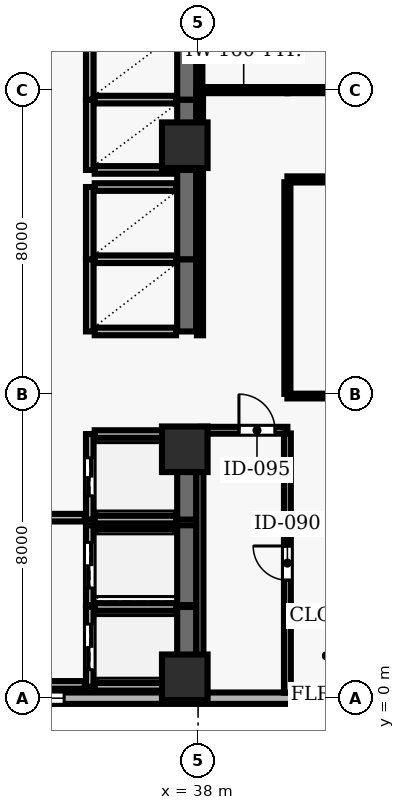
"""IFC4 building model, lengths in metres.
Left out: names, types, materials, properties, quantities, classifications, styles, units other than length and angle.
Written with IfcOpenShell. Run it as: python <this file> out.ifc"""

import sys

from ifc_helpers import new_model, si_unit, direction, frame, frame_2d, origin, origin_2d, place, context, subcontext, project, spatial, rectangle, extrude, element, fill, save


model = new_model("IFC4")
c1 = context("Model", 3, precision=1e-05, world=origin(), true_north=direction((0.0, 1.0)))
c2 = subcontext(c1, "Body", "Model", "MODEL_VIEW")
j1 = project(units=[si_unit("LENGTHUNIT", "METRE"), si_unit("PLANEANGLEUNIT", "RADIAN")], contexts=[c1])
p1 = place(None, origin())
s1 = spatial("IfcSite", under=j1, at=p1, CompositionType="ELEMENT")
p2 = place(p1, origin())
s2 = spatial("IfcBuilding", under=s1, at=p2, CompositionType="ELEMENT")
p3 = place(p2, frame((0.0, 0.0, 126.8)))
s3 = spatial("IfcBuildingStorey", under=s2, at=p3, CompositionType="ELEMENT", Elevation=126.8)
for number, where, z_axis, x_axis in (
    (1, (37.65, 0.55, 0.0), (0.0, 0.0, 1.0), (1.0, 0.0, 0.0)),
    (2, (37.65, 6.55, 0.0), (0.0, 0.0, 1.0), (1.0, 0.0, 0.0)),
    (3, (37.65, 14.55, 0.0), (0.0, 0.0, 1.0), (1.0, 0.0, 0.0)),
):
    element("IfcColumn", number, at=place(p3, frame(where, z_axis=z_axis, x_axis=x_axis)), inside=s3, PredefinedType="COLUMN", context=c2, shape_type="SweptSolid", body=[
        extrude(rectangle(XDim=1.2, YDim=1.2, at=origin_2d()), origin(), (0.0, 0.0, 1.0), 3.9),
    ])
p4 = place(p3, frame((24.5, 0.0, 0.0), z_axis=(0.0, 0.0, 1.0), x_axis=(1.0, 0.0, 0.0)))
e4 = element("IfcWall", 4, at=p4, inside=s3, PredefinedType="SOLIDWALL", context=c2, shape_type="SweptSolid", body=[
    extrude(rectangle(XDim=43.6, YDim=0.3, at=frame_2d((21.8, 0.0))), origin(), (0.0, 0.0, 1.0), 3.69),
])
p5 = place(p4, frame((1.825, 0.0, 0.9)))
e5 = element("IfcOpeningElement", 5, at=p5, cuts=e4, PredefinedType="OPENING", context=c2, shape_type="SweptSolid", body=[
    extrude(rectangle(XDim=1.8, YDim=1.8, at=frame_2d((0.9, 0.9))), frame((0.0, 0.16, 0.0), z_axis=(0.0, -1.0, 0.0), x_axis=(1.0, 0.0, 0.0)), (0.0, 0.0, 1.0), 0.32),
])
p6 = place(p4, frame((8.175, 0.0, 0.9)))
e6 = element("IfcOpeningElement", 6, at=p6, cuts=e4, PredefinedType="OPENING", context=c2, shape_type="SweptSolid", body=[
    extrude(rectangle(XDim=1.8, YDim=1.8, at=frame_2d((0.9, 0.9))), frame((0.0, 0.16, 0.0), z_axis=(0.0, -1.0, 0.0), x_axis=(1.0, 0.0, 0.0)), (0.0, 0.0, 1.0), 0.32),
])
p7 = place(p4, frame((18.175, 0.0, 0.9)))
e7 = element("IfcOpeningElement", 7, at=p7, cuts=e4, PredefinedType="OPENING", context=c2, shape_type="SweptSolid", body=[
    extrude(rectangle(XDim=1.8, YDim=1.8, at=frame_2d((0.9, 0.9))), frame((0.0, 0.16, 0.0), z_axis=(0.0, -1.0, 0.0), x_axis=(1.0, 0.0, 0.0)), (0.0, 0.0, 1.0), 0.32),
])
p8 = place(p4, frame((24.075, 0.0, 0.9)))
e8 = element("IfcOpeningElement", 8, at=p8, cuts=e4, PredefinedType="OPENING", context=c2, shape_type="SweptSolid", body=[
    extrude(rectangle(XDim=1.8, YDim=1.8, at=frame_2d((0.9, 0.9))), frame((0.0, 0.16, 0.0), z_axis=(0.0, -1.0, 0.0), x_axis=(1.0, 0.0, 0.0)), (0.0, 0.0, 1.0), 0.32),
])
p9 = place(p4, frame((29.075, 0.0, 0.9)))
e9 = element("IfcOpeningElement", 9, at=p9, cuts=e4, PredefinedType="OPENING", context=c2, shape_type="SweptSolid", body=[
    extrude(rectangle(XDim=1.8, YDim=1.8, at=frame_2d((0.9, 0.9))), frame((0.0, 0.16, 0.0), z_axis=(0.0, -1.0, 0.0), x_axis=(1.0, 0.0, 0.0)), (0.0, 0.0, 1.0), 0.32),
])
p10 = place(p4, frame((34.525, 0.0, 0.9)))
e10 = element("IfcOpeningElement", 10, at=p10, cuts=e4, PredefinedType="OPENING", context=c2, shape_type="SweptSolid", body=[
    extrude(rectangle(XDim=1.8, YDim=1.8, at=frame_2d((0.9, 0.9))), frame((0.0, 0.16, 0.0), z_axis=(0.0, -1.0, 0.0), x_axis=(1.0, 0.0, 0.0)), (0.0, 0.0, 1.0), 0.32),
])
p11 = place(p4, frame((39.975, 0.0, 0.9)))
e11 = element("IfcOpeningElement", 11, at=p11, cuts=e4, PredefinedType="OPENING", context=c2, shape_type="SweptSolid", body=[
    extrude(rectangle(XDim=1.8, YDim=1.8, at=frame_2d((0.9, 0.9))), frame((0.0, 0.16, 0.0), z_axis=(0.0, -1.0, 0.0), x_axis=(1.0, 0.0, 0.0)), (0.0, 0.0, 1.0), 0.32),
])
p12 = place(p3, frame((35.15, 2.4, 0.0), z_axis=(0.0, 0.0, 1.0), x_axis=(0.0, -1.0, 0.0)))
e12 = element("IfcWall", 12, at=p12, inside=s3, PredefinedType="SOLIDWALL", context=c2, shape_type="SweptSolid", body=[
    extrude(rectangle(XDim=2.1, YDim=0.2, at=frame_2d((1.05, 0.0))), origin(), (0.0, 0.0, 1.0), 3.69),
])
p13 = place(p12, frame((0.45, 0.0, 0.0)))
e13 = element("IfcOpeningElement", 13, at=p13, cuts=e12, PredefinedType="OPENING", context=c2, shape_type="SweptSolid", body=[
    extrude(rectangle(XDim=1.2, YDim=2.15, at=frame_2d((0.6, 1.075))), frame((0.0, 0.11, 0.0), z_axis=(0.0, -1.0, 0.0), x_axis=(1.0, 0.0, 0.0)), (0.0, 0.0, 1.0), 0.22),
])
p14 = place(p3, frame((37.7, 0.3, 0.0), z_axis=(0.0, 0.0, 1.0), x_axis=(0.0, 1.0, 0.0)))
e14 = element("IfcWall", 14, at=p14, inside=s3, PredefinedType="SHEAR", context=c2, shape_type="SweptSolid", body=[
    extrude(rectangle(XDim=2.1, YDim=0.5, at=frame_2d((1.05, 0.0))), origin(), (0.0, 0.0, 1.0), 3.69),
])
for number, where, z_axis, x_axis in (
    (15, (35.28, 0.3, 0.0), (0.0, 0.0, 1.0), (1.0, 0.0, 0.0)),
    (16, (37.42, 2.4, 0.0), (0.0, 0.0, 1.0), (-1.0, 0.0, 0.0)),
):
    element("IfcWall", number, at=place(p3, frame(where, z_axis=z_axis, x_axis=x_axis)), inside=s3, PredefinedType="SOLIDWALL", context=c2, shape_type="SweptSolid", body=[
        extrude(rectangle(XDim=2.14, YDim=0.2, at=frame_2d((1.07, 0.0))), origin(), (0.0, 0.0, 1.0), 3.69),
    ])
p15 = place(p3, frame((35.15, 4.55, 0.0), z_axis=(0.0, 0.0, 1.0), x_axis=(0.0, -1.0, 0.0)))
e17 = element("IfcWall", 17, at=p15, inside=s3, PredefinedType="SOLIDWALL", context=c2, shape_type="SweptSolid", body=[
    extrude(rectangle(XDim=2.1, YDim=0.2, at=frame_2d((1.05, 0.0))), origin(), (0.0, 0.0, 1.0), 3.69),
])
p16 = place(p15, frame((0.45, 0.0, 0.0)))
e18 = element("IfcOpeningElement", 18, at=p16, cuts=e17, PredefinedType="OPENING", context=c2, shape_type="SweptSolid", body=[
    extrude(rectangle(XDim=1.2, YDim=2.15, at=frame_2d((0.6, 1.075))), frame((0.0, 0.11, 0.0), z_axis=(0.0, -1.0, 0.0), x_axis=(1.0, 0.0, 0.0)), (0.0, 0.0, 1.0), 0.22),
])
p17 = place(p3, frame((37.7, 2.45, 0.0), z_axis=(0.0, 0.0, 1.0), x_axis=(0.0, 1.0, 0.0)))
e19 = element("IfcWall", 19, at=p17, inside=s3, PredefinedType="SHEAR", context=c2, shape_type="SweptSolid", body=[
    extrude(rectangle(XDim=2.1, YDim=0.5, at=frame_2d((1.05, 0.0))), origin(), (0.0, 0.0, 1.0), 3.69),
])
p18 = place(p3, frame((37.42, 4.55, 0.0), z_axis=(0.0, 0.0, 1.0), x_axis=(-1.0, 0.0, 0.0)))
e20 = element("IfcWall", 20, at=p18, inside=s3, PredefinedType="SOLIDWALL", context=c2, shape_type="SweptSolid", body=[
    extrude(rectangle(XDim=2.14, YDim=0.2, at=frame_2d((1.07, 0.0))), origin(), (0.0, 0.0, 1.0), 3.69),
])
p19 = place(p3, frame((35.15, 6.95, 0.0), z_axis=(0.0, 0.0, 1.0), x_axis=(0.0, -1.0, 0.0)))
e21 = element("IfcWall", 21, at=p19, inside=s3, PredefinedType="SOLIDWALL", context=c2, shape_type="SweptSolid", body=[
    extrude(rectangle(XDim=2.25, YDim=0.2, at=frame_2d((1.125, 0.0))), origin(), (0.0, 0.0, 1.0), 3.69),
])
p20 = place(p19, frame((0.625, 0.0, 0.0)))
e22 = element("IfcOpeningElement", 22, at=p20, cuts=e21, PredefinedType="OPENING", context=c2, shape_type="SweptSolid", body=[
    extrude(rectangle(XDim=1.0, YDim=2.1, at=frame_2d((0.5, 1.05))), frame((0.0, 0.11, 0.0), z_axis=(0.0, -1.0, 0.0), x_axis=(1.0, 0.0, 0.0)), (0.0, 0.0, 1.0), 0.22),
])
p21 = place(p3, frame((37.7, 4.7, 0.0), z_axis=(0.0, 0.0, 1.0), x_axis=(0.0, 1.0, 0.0)))
e23 = element("IfcWall", 23, at=p21, inside=s3, PredefinedType="SHEAR", context=c2, shape_type="SweptSolid", body=[
    extrude(rectangle(XDim=2.25, YDim=0.5, at=frame_2d((1.125, 0.0))), origin(), (0.0, 0.0, 1.0), 3.69),
])
for number, where, z_axis, x_axis in (
    (24, (35.28, 4.7, 0.0), (0.0, 0.0, 1.0), (1.0, 0.0, 0.0)),
    (25, (37.42, 6.95, 0.0), (0.0, 0.0, 1.0), (-1.0, 0.0, 0.0)),
):
    element("IfcWall", number, at=place(p3, frame(where, z_axis=z_axis, x_axis=x_axis)), inside=s3, PredefinedType="SOLIDWALL", context=c2, shape_type="SweptSolid", body=[
        extrude(rectangle(XDim=2.14, YDim=0.2, at=frame_2d((1.07, 0.0))), origin(), (0.0, 0.0, 1.0), 3.69),
    ])
p22 = place(p3, frame((35.15, 11.55, 0.0), z_axis=(0.0, 0.0, 1.0), x_axis=(0.0, -1.0, 0.0)))
e26 = element("IfcWall", 26, at=p22, inside=s3, PredefinedType="SOLIDWALL", context=c2, shape_type="SweptSolid", body=[
    extrude(rectangle(XDim=1.9, YDim=0.2, at=frame_2d((0.95, 0.0))), origin(), (0.0, 0.0, 1.0), 3.69),
])
p23 = place(p3, frame((37.7, 9.65, 0.0), z_axis=(0.0, 0.0, 1.0), x_axis=(0.0, 1.0, 0.0)))
e27 = element("IfcWall", 27, at=p23, inside=s3, PredefinedType="SHEAR", context=c2, shape_type="SweptSolid", body=[
    extrude(rectangle(XDim=1.9, YDim=0.5, at=frame_2d((0.95, 0.0))), origin(), (0.0, 0.0, 1.0), 3.69),
])
for number, where, z_axis, x_axis in (
    (28, (35.28, 9.65, 0.0), (0.0, 0.0, 1.0), (1.0, 0.0, 0.0)),
    (29, (37.42, 11.55, 0.0), (0.0, 0.0, 1.0), (-1.0, 0.0, 0.0)),
):
    element("IfcWall", number, at=place(p3, frame(where, z_axis=z_axis, x_axis=x_axis)), inside=s3, PredefinedType="SOLIDWALL", context=c2, shape_type="SweptSolid", body=[
        extrude(rectangle(XDim=2.14, YDim=0.2, at=frame_2d((1.07, 0.0))), origin(), (0.0, 0.0, 1.0), 3.69),
    ])
p24 = place(p3, frame((35.15, 13.45, 0.0), z_axis=(0.0, 0.0, 1.0), x_axis=(0.0, -1.0, 0.0)))
e30 = element("IfcWall", 30, at=p24, inside=s3, PredefinedType="SOLIDWALL", context=c2, shape_type="SweptSolid", body=[
    extrude(rectangle(XDim=1.9, YDim=0.2, at=frame_2d((0.95, 0.0))), origin(), (0.0, 0.0, 1.0), 3.69),
])
p25 = place(p3, frame((37.7, 11.55, 0.0), z_axis=(0.0, 0.0, 1.0), x_axis=(0.0, 1.0, 0.0)))
e31 = element("IfcWall", 31, at=p25, inside=s3, PredefinedType="SHEAR", context=c2, shape_type="SweptSolid", body=[
    extrude(rectangle(XDim=2.35, YDim=0.5, at=frame_2d((1.175, 0.0))), origin(), (0.0, 0.0, 1.0), 3.69),
])
p26 = place(p3, frame((37.42, 13.45, 0.0), z_axis=(0.0, 0.0, 1.0), x_axis=(-1.0, 0.0, 0.0)))
e32 = element("IfcWall", 32, at=p26, inside=s3, PredefinedType="SOLIDWALL", context=c2, shape_type="SweptSolid", body=[
    extrude(rectangle(XDim=2.14, YDim=0.2, at=frame_2d((1.07, 0.0))), origin(), (0.0, 0.0, 1.0), 3.69),
])
p27 = place(p3, frame((35.15, 15.75, 0.0), z_axis=(0.0, 0.0, 1.0), x_axis=(0.0, -1.0, 0.0)))
e33 = element("IfcWall", 33, at=p27, inside=s3, PredefinedType="SOLIDWALL", context=c2, shape_type="SweptSolid", body=[
    extrude(rectangle(XDim=1.85, YDim=0.2, at=frame_2d((0.925, 0.0))), origin(), (0.0, 0.0, 1.0), 3.69),
])
p28 = place(p3, frame((37.7, 13.9, 0.0), z_axis=(0.0, 0.0, 1.0), x_axis=(0.0, 1.0, 0.0)))
e34 = element("IfcWall", 34, at=p28, inside=s3, PredefinedType="SHEAR", context=c2, shape_type="SweptSolid", body=[
    extrude(rectangle(XDim=1.85, YDim=0.5, at=frame_2d((0.925, 0.0))), origin(), (0.0, 0.0, 1.0), 3.69),
])
for number, where, z_axis, x_axis in (
    (35, (35.28, 13.9, 0.0), (0.0, 0.0, 1.0), (1.0, 0.0, 0.0)),
    (36, (37.42, 15.75, 0.0), (0.0, 0.0, 1.0), (-1.0, 0.0, 0.0)),
):
    element("IfcWall", number, at=place(p3, frame(where, z_axis=z_axis, x_axis=x_axis)), inside=s3, PredefinedType="SOLIDWALL", context=c2, shape_type="SweptSolid", body=[
        extrude(rectangle(XDim=2.14, YDim=0.2, at=frame_2d((1.07, 0.0))), origin(), (0.0, 0.0, 1.0), 3.69),
    ])
p29 = place(p3, frame((35.15, 17.6, 0.0), z_axis=(0.0, 0.0, 1.0), x_axis=(0.0, -1.0, 0.0)))
e37 = element("IfcWall", 37, at=p29, inside=s3, PredefinedType="SOLIDWALL", context=c2, shape_type="SweptSolid", body=[
    extrude(rectangle(XDim=1.85, YDim=0.2, at=frame_2d((0.925, 0.0))), origin(), (0.0, 0.0, 1.0), 3.69),
])
p30 = place(p3, frame((37.7, 15.75, 0.0), z_axis=(0.0, 0.0, 1.0), x_axis=(0.0, 1.0, 0.0)))
e38 = element("IfcWall", 38, at=p30, inside=s3, PredefinedType="SHEAR", context=c2, shape_type="SweptSolid", body=[
    extrude(rectangle(XDim=1.85, YDim=0.5, at=frame_2d((0.925, 0.0))), origin(), (0.0, 0.0, 1.0), 3.69),
])
p31 = place(p3, frame((31.65, 0.35, 0.0), z_axis=(0.0, 0.0, 1.0), x_axis=(1.0, 0.0, 0.0)))
e39 = element("IfcWall", 39, at=p31, inside=s3, PredefinedType="SOLIDWALL", context=c2, shape_type="SweptSolid", body=[
    extrude(rectangle(XDim=3.37, YDim=0.2, at=frame_2d((1.685, 0.0))), origin(), (0.0, 0.0, 1.0), 3.69),
])
p32 = place(p3, frame((35.02, 4.75, 0.0), z_axis=(0.0, 0.0, 1.0), x_axis=(-1.0, 0.0, 0.0)))
e40 = element("IfcWall", 40, at=p32, inside=s3, PredefinedType="SOLIDWALL", context=c2, shape_type="SweptSolid", body=[
    extrude(rectangle(XDim=3.11, YDim=0.2, at=frame_2d((1.555, 0.0))), origin(), (0.0, 0.0, 1.0), 3.69),
])
p33 = place(p32, frame((1.03, 0.0, 0.0)))
e41 = element("IfcOpeningElement", 41, at=p33, cuts=e40, PredefinedType="OPENING", context=c2, shape_type="SweptSolid", body=[
    extrude(rectangle(XDim=1.05, YDim=2.15, at=frame_2d((0.525, 1.075))), frame((0.0, 0.11, 0.0), z_axis=(0.0, -1.0, 0.0), x_axis=(1.0, 0.0, 0.0)), (0.0, 0.0, 1.0), 0.22),
])
p34 = place(p3, frame((38.05, 7.05, 0.0), z_axis=(0.0, 0.0, 1.0), x_axis=(1.0, 0.0, 0.0)))
e42 = element("IfcWall", 42, at=p34, inside=s3, PredefinedType="PARTITIONING", context=c2, shape_type="SweptSolid", body=[
    extrude(rectangle(XDim=2.3, YDim=0.18, at=frame_2d((1.15, 0.0))), origin(), (0.0, 0.0, 1.0), 3.69),
])
p35 = place(p34, frame((1.025, 0.0, 0.0)))
e43 = element("IfcOpeningElement", 43, at=p35, cuts=e42, PredefinedType="OPENING", context=c2, shape_type="SweptSolid", body=[
    extrude(rectangle(XDim=0.95, YDim=2.1, at=frame_2d((0.475, 1.05))), frame((0.0, 0.1, 0.0), z_axis=(0.0, -1.0, 0.0), x_axis=(1.0, 0.0, 0.0)), (0.0, 0.0, 1.0), 0.2),
])
p36 = place(p3, frame((40.35, 13.65, 0.0), z_axis=(0.0, 0.0, 1.0), x_axis=(1.0, 0.0, 0.0)))
e44 = element("IfcWall", 44, at=p36, inside=s3, PredefinedType="PARTITIONING", context=c2, shape_type="SweptSolid", body=[
    extrude(rectangle(XDim=7.56, YDim=0.16, at=frame_2d((3.78, 0.0))), origin(), (0.0, 0.0, 1.0), 3.69),
])
p37 = place(p36, frame((3.33, 0.0, 0.0)))
e45 = element("IfcOpeningElement", 45, at=p37, cuts=e44, PredefinedType="OPENING", context=c2, shape_type="SweptSolid", body=[
    extrude(rectangle(XDim=0.9, YDim=2.1, at=frame_2d((0.45, 1.05))), frame((0.0, 0.09, 0.0), z_axis=(0.0, -1.0, 0.0), x_axis=(1.0, 0.0, 0.0)), (0.0, 0.0, 1.0), 0.18),
])
p38 = place(p3, frame((40.35, 16.0, 0.0), z_axis=(0.0, 0.0, 1.0), x_axis=(-1.0, 0.0, 0.0)))
e46 = element("IfcWall", 46, at=p38, inside=s3, PredefinedType="PARTITIONING", context=c2, shape_type="SweptSolid", body=[
    extrude(rectangle(XDim=2.3, YDim=0.16, at=frame_2d((1.15, 0.0))), origin(), (0.0, 0.0, 1.0), 3.69),
])
p39 = place(p3, frame((40.35, 16.0, 0.0), z_axis=(0.0, 0.0, 1.0), x_axis=(1.0, 0.0, 0.0)))
e47 = element("IfcWall", 47, at=p39, inside=s3, PredefinedType="PARTITIONING", context=c2, shape_type="SweptSolid", body=[
    extrude(rectangle(XDim=6.856, YDim=0.16, at=frame_2d((3.428, 0.0))), origin(), (0.0, 0.0, 1.0), 3.39),
])
p40 = place(p39, frame((2.978, 0.0, 0.0)))
e48 = element("IfcOpeningElement", 48, at=p40, cuts=e47, PredefinedType="OPENING", context=c2, shape_type="SweptSolid", body=[
    extrude(rectangle(XDim=0.9, YDim=2.1, at=frame_2d((0.45, 1.05))), frame((0.0, 0.09, 0.0), z_axis=(0.0, -1.0, 0.0), x_axis=(1.0, 0.0, 0.0)), (0.0, 0.0, 1.0), 0.18),
])
p41 = place(p3, frame((47.91, 7.95, 0.0), z_axis=(0.0, 0.0, 1.0), x_axis=(-1.0, 0.0, 0.0)))
e49 = element("IfcWall", 49, at=p41, inside=s3, PredefinedType="PARTITIONING", context=c2, shape_type="SweptSolid", body=[
    extrude(rectangle(XDim=7.56, YDim=0.125, at=frame_2d((3.78, 0.0))), origin(), (0.0, 0.0, 1.0), 3.074),
])
p42 = place(p3, frame((38.05, 6.965, 0.0), z_axis=(0.0, 0.0, 1.0), x_axis=(0.0, -1.0, 0.0)))
e50 = element("IfcWall", 50, at=p42, inside=s3, PredefinedType="PARTITIONING", context=c2, shape_type="SweptSolid", body=[
    extrude(rectangle(XDim=6.82, YDim=0.18, at=frame_2d((3.41, 0.0))), origin(), (0.0, 0.0, 1.0), 3.074),
])
p43 = place(p3, frame((38.05, 15.925, 0.0), z_axis=(0.0, 0.0, 1.0), x_axis=(0.0, -1.0, 0.0)))
e51 = element("IfcWall", 51, at=p43, inside=s3, PredefinedType="PARTITIONING", context=c2, shape_type="SweptSolid", body=[
    extrude(rectangle(XDim=6.375, YDim=0.16, at=frame_2d((3.188, 0.0))), origin(), (0.0, 0.0, 1.0), 3.074),
])
p44 = place(p3, frame((38.05, 23.85, 0.0), z_axis=(0.0, 0.0, 1.0), x_axis=(0.0, -1.0, 0.0)))
e52 = element("IfcWall", 52, at=p44, inside=s3, PredefinedType="PARTITIONING", context=c2, shape_type="SweptSolid", body=[
    extrude(rectangle(XDim=7.775, YDim=0.125, at=frame_2d((3.888, 0.0))), origin(), (0.0, 0.0, 1.0), 3.074),
])
p45 = place(p3, frame((40.35, 0.145, 0.0), z_axis=(0.0, 0.0, 1.0), x_axis=(0.0, 1.0, 0.0)))
e53 = element("IfcWall", 53, at=p45, inside=s3, PredefinedType="PARTITIONING", context=c2, shape_type="SweptSolid", body=[
    extrude(rectangle(XDim=6.82, YDim=0.18, at=frame_2d((3.41, 0.0))), origin(), (0.0, 0.0, 1.0), 3.69),
])
p46 = place(p45, frame((2.96, 0.0, 0.0)))
e54 = element("IfcOpeningElement", 54, at=p46, cuts=e53, PredefinedType="OPENING", context=c2, shape_type="SweptSolid", body=[
    extrude(rectangle(XDim=0.9, YDim=2.1, at=frame_2d((0.45, 1.05))), frame((0.0, 0.1, 0.0), z_axis=(0.0, -1.0, 0.0), x_axis=(1.0, 0.0, 0.0)), (0.0, 0.0, 1.0), 0.2),
])
p47 = place(p3, frame((40.35, 8.008, 0.0), z_axis=(0.0, 0.0, 1.0), x_axis=(0.0, 1.0, 0.0)))
e55 = element("IfcWall", 55, at=p47, inside=s3, PredefinedType="PARTITIONING", context=c2, shape_type="SweptSolid", body=[
    extrude(rectangle(XDim=5.567, YDim=0.16, at=frame_2d((2.783, 0.0))), origin(), (0.0, 0.0, 1.0), 3.69),
])
p48 = place(p6, origin())
e56 = element("IfcWindow", 56, at=p48, inside=s3, PartitioningType="SINGLE_PANEL", PredefinedType="WINDOW", context=c2, shape_type="SweptSolid", body=[
    extrude(rectangle(XDim=1.8, YDim=1.8, at=frame_2d((0.9, 0.9))), frame((0.0, 0.03, 0.0), z_axis=(0.0, -1.0, 0.0), x_axis=(1.0, 0.0, 0.0)), (0.0, 0.0, 1.0), 0.06),
])
fill(e6, e56)
p49 = place(p13, origin())
e57 = element("IfcDoor", 57, at=p49, inside=s3, OperationType="DOUBLE_DOOR_SLIDING", PredefinedType="DOOR", context=c2, shape_type="SweptSolid", body=[
    extrude(rectangle(XDim=1.2, YDim=2.15, at=frame_2d((0.6, 1.075))), frame((0.0, 0.025, 0.0), z_axis=(0.0, -1.0, 0.0), x_axis=(1.0, 0.0, 0.0)), (0.0, 0.0, 1.0), 0.05),
])
fill(e13, e57)
p50 = place(p16, origin())
e58 = element("IfcDoor", 58, at=p50, inside=s3, OperationType="DOUBLE_DOOR_SLIDING", PredefinedType="DOOR", context=c2, shape_type="SweptSolid", body=[
    extrude(rectangle(XDim=1.2, YDim=2.15, at=frame_2d((0.6, 1.075))), frame((0.0, 0.025, 0.0), z_axis=(0.0, -1.0, 0.0), x_axis=(1.0, 0.0, 0.0)), (0.0, 0.0, 1.0), 0.05),
])
fill(e18, e58)
p51 = place(p20, origin())
e59 = element("IfcDoor", 59, at=p51, inside=s3, OperationType="DOUBLE_DOOR_SLIDING", PredefinedType="DOOR", context=c2, shape_type="SweptSolid", body=[
    extrude(rectangle(XDim=1.0, YDim=2.1, at=frame_2d((0.5, 1.05))), frame((0.0, 0.025, 0.0), z_axis=(0.0, -1.0, 0.0), x_axis=(1.0, 0.0, 0.0)), (0.0, 0.0, 1.0), 0.05),
])
fill(e22, e59)
p52 = place(p35, origin())
e60 = element("IfcDoor", 60, at=p52, inside=s3, OperationType="SINGLE_SWING_LEFT", PredefinedType="DOOR", context=c2, shape_type="SweptSolid", body=[
    extrude(rectangle(XDim=0.95, YDim=2.1, at=frame_2d((0.475, 1.05))), frame((0.0, 0.025, 0.0), z_axis=(0.0, -1.0, 0.0), x_axis=(1.0, 0.0, 0.0)), (0.0, 0.0, 1.0), 0.05),
])
fill(e43, e60)
p53 = place(p46, origin())
e61 = element("IfcDoor", 61, at=p53, inside=s3, OperationType="SINGLE_SWING_RIGHT", PredefinedType="DOOR", context=c2, shape_type="SweptSolid", body=[
    extrude(rectangle(XDim=0.9, YDim=2.1, at=frame_2d((0.45, 1.05))), frame((0.0, 0.025, 0.0), z_axis=(0.0, -1.0, 0.0), x_axis=(1.0, 0.0, 0.0)), (0.0, 0.0, 1.0), 0.05),
])
fill(e54, e61)
save(model, sys.argv[1])
